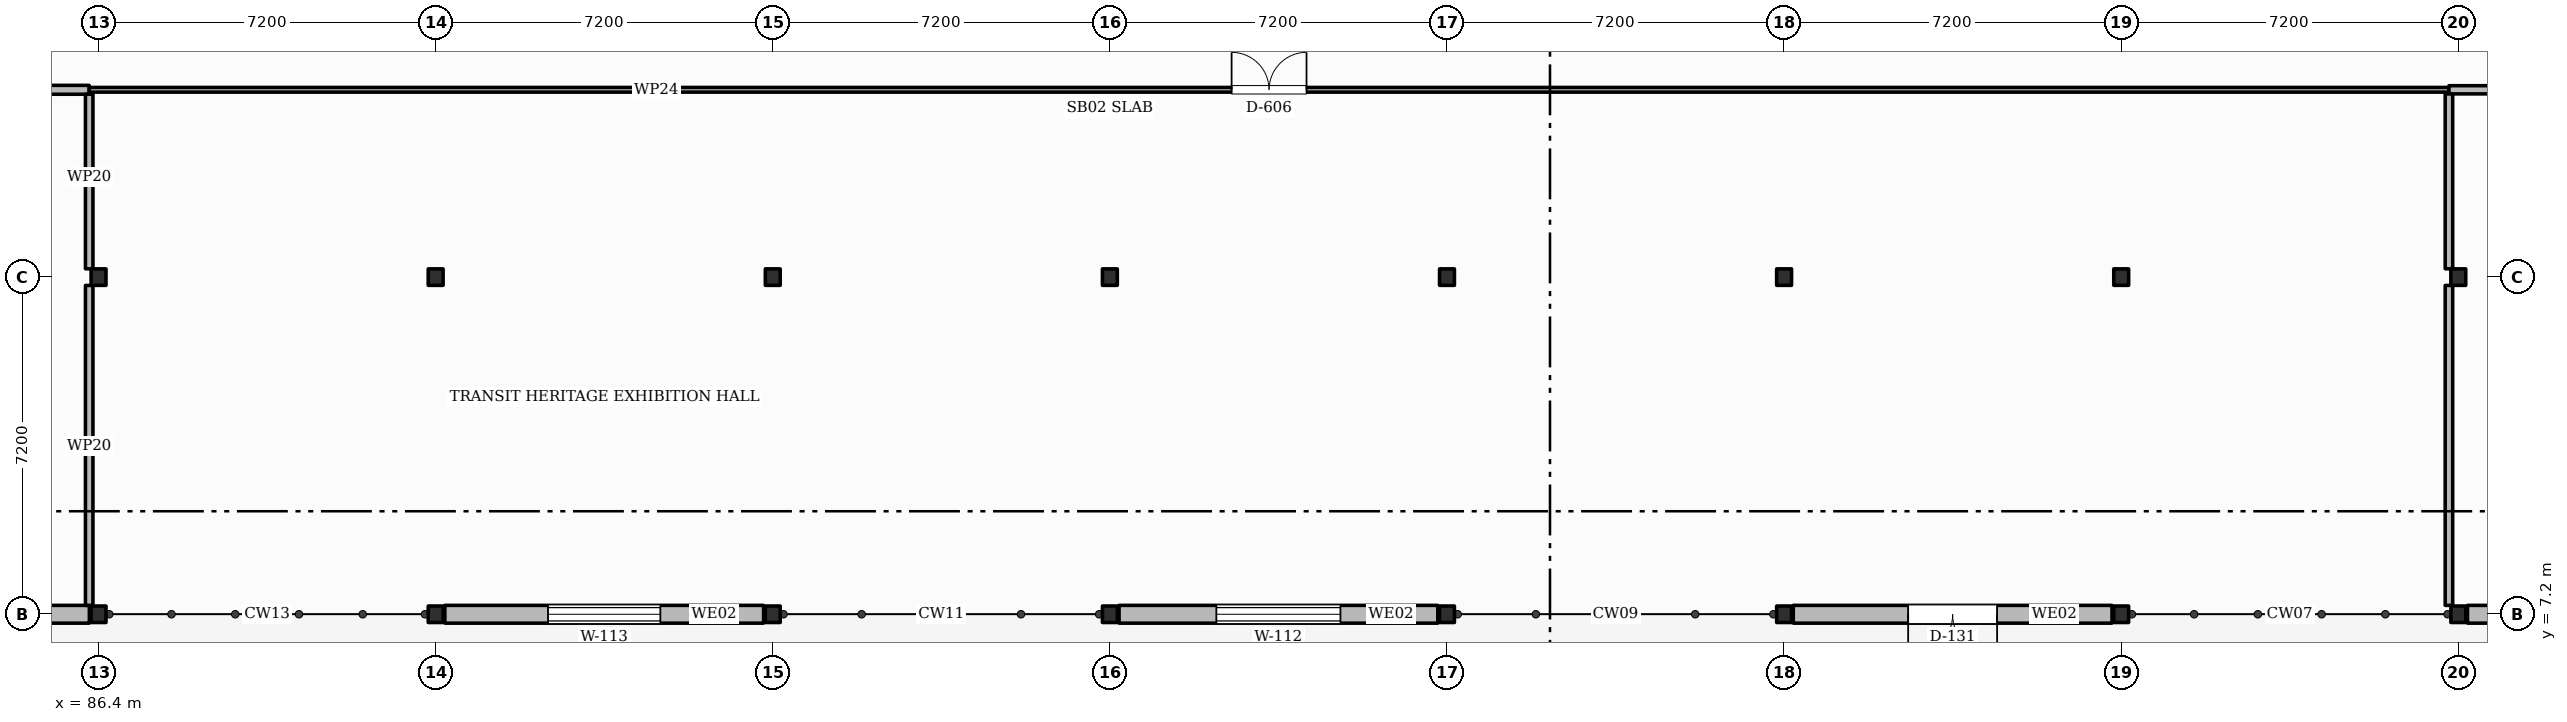
"""IFC4 building model, lengths in metres.
Left out: names, types, materials, properties, quantities, classifications, styles, units other than length and angle.
Written with IfcOpenShell. Run it as: python <this file> out.ifc"""

import sys

from ifc_helpers import new_model, si_unit, direction, frame, frame_2d, origin, origin_2d, place, context, subcontext, project, spatial, rectangle, i_section, extrude, element, fill, save


model = new_model("IFC4")
c1 = context("Model", 3, precision=1e-05, world=origin(), true_north=direction((0.0, 1.0)))
c2 = subcontext(c1, "Body", "Model", "MODEL_VIEW")
j1 = project(units=[si_unit("LENGTHUNIT", "METRE"), si_unit("PLANEANGLEUNIT", "RADIAN")], contexts=[c1])
p1 = place(None, origin())
s1 = spatial("IfcSite", under=j1, at=p1, CompositionType="ELEMENT")
p2 = place(p1, origin())
s2 = spatial("IfcBuilding", under=s1, at=p2, CompositionType="ELEMENT")
p3 = place(p2, origin())
s3 = spatial("IfcBuildingStorey", under=s2, at=p3, CompositionType="ELEMENT", Elevation=0.0)
for number, where, z_axis, x_axis in (
    (1, (86.4, 7.2, -0.3), (0.0, 0.0, 1.0), (1.0, 0.0, 0.0)),
    (2, (86.4, 14.4, -0.3), (0.0, 0.0, 1.0), (1.0, 0.0, 0.0)),
    (3, (93.6, 7.2, -0.3), (0.0, 0.0, 1.0), (1.0, 0.0, 0.0)),
    (4, (93.6, 14.4, -0.3), (0.0, 0.0, 1.0), (1.0, 0.0, 0.0)),
    (5, (100.8, 7.2, -0.3), (0.0, 0.0, 1.0), (1.0, 0.0, 0.0)),
    (6, (100.8, 14.4, -0.3), (0.0, 0.0, 1.0), (1.0, 0.0, 0.0)),
    (7, (108.0, 7.2, -0.3), (0.0, 0.0, 1.0), (1.0, 0.0, 0.0)),
    (8, (108.0, 14.4, -0.3), (0.0, 0.0, 1.0), (1.0, 0.0, 0.0)),
    (9, (115.2, 7.2, -0.3), (0.0, 0.0, 1.0), (1.0, 0.0, 0.0)),
    (10, (115.2, 14.4, -0.3), (0.0, 0.0, 1.0), (1.0, 0.0, 0.0)),
    (11, (122.4, 7.2, -0.3), (0.0, 0.0, 1.0), (1.0, 0.0, 0.0)),
    (12, (122.4, 14.4, -0.3), (0.0, 0.0, 1.0), (1.0, 0.0, 0.0)),
    (13, (129.6, 7.2, -0.3), (0.0, 0.0, 1.0), (1.0, 0.0, 0.0)),
    (14, (129.6, 14.4, -0.3), (0.0, 0.0, 1.0), (1.0, 0.0, 0.0)),
    (15, (136.8, 7.2, -0.3), (0.0, 0.0, 1.0), (1.0, 0.0, 0.0)),
    (16, (136.8, 14.4, -0.3), (0.0, 0.0, 1.0), (1.0, 0.0, 0.0)),
):
    element("IfcColumn", number, at=place(p3, frame(where, z_axis=z_axis, x_axis=x_axis)), inside=s3, PredefinedType="COLUMN", context=c2, shape_type="SweptSolid", body=[
        extrude(i_section(OverallWidth=0.318, OverallDepth=0.353, WebThickness=0.023, FlangeThickness=0.038, FilletRadius=0.015, at=origin_2d()), origin(), (0.0, 0.0, 1.0), 5.7),
    ])
p4 = place(p3, frame((143.804, 7.2, 0.0), z_axis=(0.0, 0.0, 1.0), x_axis=(-1.0, 0.0, 0.0)))
e17 = element("IfcWall", 17, at=p4, inside=s3, PredefinedType="SOLIDWALL", context=c2, shape_type="SweptSolid", body=[
    extrude(rectangle(XDim=6.807, YDim=0.38, at=frame_2d((3.404, 0.0))), origin(), (0.0, 0.0, 1.0), 4.618),
])
p5 = place(p4, frame((2.504, 0.0, 0.0)))
e18 = element("IfcOpeningElement", 18, at=p5, cuts=e17, PredefinedType="OPENING", context=c2, shape_type="SweptSolid", body=[
    extrude(rectangle(XDim=1.8, YDim=2.2, at=frame_2d((0.9, 1.1))), frame((0.0, 0.2, 0.0), z_axis=(0.0, -1.0, 0.0), x_axis=(1.0, 0.0, 0.0)), (0.0, 0.0, 1.0), 0.4),
])
p6 = place(p3, frame((129.404, 7.2, 0.0), z_axis=(0.0, 0.0, 1.0), x_axis=(-1.0, 0.0, 0.0)))
e19 = element("IfcWall", 19, at=p6, inside=s3, PredefinedType="SOLIDWALL", context=c2, shape_type="SweptSolid", body=[
    extrude(rectangle(XDim=6.808, YDim=0.38, at=frame_2d((3.404, 0.0))), origin(), (0.0, 0.0, 1.0), 4.618),
])
p7 = place(p6, frame((2.454, 0.0, 0.0)))
e20 = element("IfcOpeningElement", 20, at=p7, cuts=e19, PredefinedType="OPENING", context=c2, shape_type="SweptSolid", body=[
    extrude(rectangle(XDim=1.9, YDim=2.25, at=frame_2d((0.95, 1.125))), frame((0.0, 0.2, 0.0), z_axis=(0.0, -1.0, 0.0), x_axis=(1.0, 0.0, 0.0)), (0.0, 0.0, 1.0), 0.4),
])
p8 = place(p3, frame((115.004, 7.2, 0.0), z_axis=(0.0, 0.0, 1.0), x_axis=(-1.0, 0.0, 0.0)))
e21 = element("IfcWall", 21, at=p8, inside=s3, PredefinedType="SOLIDWALL", context=c2, shape_type="SweptSolid", body=[
    extrude(rectangle(XDim=6.807, YDim=0.38, at=frame_2d((3.404, 0.0))), origin(), (0.0, 0.0, 1.0), 4.618),
])
p9 = place(p8, frame((2.079, 0.0, 1.05)))
e22 = element("IfcOpeningElement", 22, at=p9, cuts=e21, PredefinedType="OPENING", context=c2, shape_type="SweptSolid", body=[
    extrude(rectangle(XDim=2.65, YDim=1.6, at=frame_2d((1.325, 0.8))), frame((0.0, 0.2, 0.0), z_axis=(0.0, -1.0, 0.0), x_axis=(1.0, 0.0, 0.0)), (0.0, 0.0, 1.0), 0.4),
])
p10 = place(p3, frame((100.604, 7.2, 0.0), z_axis=(0.0, 0.0, 1.0), x_axis=(-1.0, 0.0, 0.0)))
e23 = element("IfcWall", 23, at=p10, inside=s3, PredefinedType="SOLIDWALL", context=c2, shape_type="SweptSolid", body=[
    extrude(rectangle(XDim=6.807, YDim=0.38, at=frame_2d((3.404, 0.0))), origin(), (0.0, 0.0, 1.0), 4.618),
])
p11 = place(p10, frame((2.204, 0.0, 1.05)))
e24 = element("IfcOpeningElement", 24, at=p11, cuts=e23, PredefinedType="OPENING", context=c2, shape_type="SweptSolid", body=[
    extrude(rectangle(XDim=2.4, YDim=1.8, at=frame_2d((1.2, 0.9))), frame((0.0, 0.2, 0.0), z_axis=(0.0, -1.0, 0.0), x_axis=(1.0, 0.0, 0.0)), (0.0, 0.0, 1.0), 0.4),
])
p12 = place(p3, frame((86.204, 7.2, 0.0), z_axis=(0.0, 0.0, 1.0), x_axis=(-1.0, 0.0, 0.0)))
e25 = element("IfcWall", 25, at=p12, inside=s3, PredefinedType="SOLIDWALL", context=c2, shape_type="SweptSolid", body=[
    extrude(rectangle(XDim=6.807, YDim=0.38, at=frame_2d((3.404, 0.0))), origin(), (0.0, 0.0, 1.0), 4.618),
])
p13 = place(p12, frame((2.904, 0.0, 1.05)))
e26 = element("IfcOpeningElement", 26, at=p13, cuts=e25, PredefinedType="OPENING", context=c2, shape_type="SweptSolid", body=[
    extrude(rectangle(XDim=1.0, YDim=1.6, at=frame_2d((0.5, 0.8))), frame((0.0, 0.2, 0.0), z_axis=(0.0, -1.0, 0.0), x_axis=(1.0, 0.0, 0.0)), (0.0, 0.0, 1.0), 0.4),
])
p14 = place(p3, frame((57.825, 18.4, 0.0), z_axis=(0.0, 0.0, 1.0), x_axis=(1.0, 0.0, 0.0)))
e27 = element("IfcWall", 27, at=p14, inside=s3, PredefinedType="PARTITIONING", context=c2, shape_type="SweptSolid", body=[
    extrude(rectangle(XDim=28.375, YDim=0.19, at=frame_2d((14.188, 0.0))), origin(), (0.0, 0.0, 1.0), 3.55),
])
p15 = place(p14, frame((10.105, 0.0, 0.0)))
e28 = element("IfcOpeningElement", 28, at=p15, cuts=e27, PredefinedType="OPENING", context=c2, shape_type="SweptSolid", body=[
    extrude(rectangle(XDim=1.6, YDim=2.2, at=frame_2d((0.8, 1.1))), frame((0.0, 0.105, 0.0), z_axis=(0.0, -1.0, 0.0), x_axis=(1.0, 0.0, 0.0)), (0.0, 0.0, 1.0), 0.21),
])
p16 = place(p3, frame((86.2, 18.4, 0.0), z_axis=(0.0, 0.0, 1.0), x_axis=(1.0, 0.0, 0.0)))
e29 = element("IfcWall", 29, at=p16, inside=s3, PredefinedType="PARTITIONING", context=c2, shape_type="SweptSolid", body=[
    extrude(rectangle(XDim=50.4, YDim=0.1, at=frame_2d((25.2, 0.0))), origin(), (0.0, 0.0, 1.0), 3.55),
])
p17 = place(p16, frame((24.4, 0.0, 0.0)))
e30 = element("IfcOpeningElement", 30, at=p17, cuts=e29, PredefinedType="OPENING", context=c2, shape_type="SweptSolid", body=[
    extrude(rectangle(XDim=1.6, YDim=2.2, at=frame_2d((0.8, 1.1))), frame((0.0, 0.06, 0.0), z_axis=(0.0, -1.0, 0.0), x_axis=(1.0, 0.0, 0.0)), (0.0, 0.0, 1.0), 0.12),
])
p18 = place(p3, frame((136.6, 18.4, 0.0), z_axis=(0.0, 0.0, 1.0), x_axis=(1.0, 0.0, 0.0)))
e31 = element("IfcWall", 31, at=p18, inside=s3, PredefinedType="PARTITIONING", context=c2, shape_type="SweptSolid", body=[
    extrude(rectangle(XDim=21.575, YDim=0.175, at=frame_2d((10.788, 0.0))), origin(), (0.0, 0.0, 1.0), 3.55),
])
p19 = place(p18, frame((17.75, 0.0, 0.0)))
e32 = element("IfcOpeningElement", 32, at=p19, cuts=e31, PredefinedType="OPENING", context=c2, shape_type="SweptSolid", body=[
    extrude(rectangle(XDim=1.04, YDim=2.1, at=frame_2d((0.52, 1.05))), frame((0.0, 0.097, 0.0), z_axis=(0.0, -1.0, 0.0), x_axis=(1.0, 0.0, 0.0)), (0.0, 0.0, 1.0), 0.195),
])
p20 = place(p3, frame((86.2, 7.39, 0.0), z_axis=(0.0, 0.0, 1.0), x_axis=(0.0, 1.0, 0.0)))
e33 = element("IfcWall", 33, at=p20, inside=s3, PredefinedType="PARTITIONING", context=c2, shape_type="SweptSolid", body=[
    extrude(rectangle(XDim=6.832, YDim=0.16, at=frame_2d((3.416, 0.0))), origin(), (0.0, 0.0, 1.0), 3.55),
])
p21 = place(p3, frame((86.2, 14.578, 0.0), z_axis=(0.0, 0.0, 1.0), x_axis=(0.0, 1.0, 0.0)))
e34 = element("IfcWall", 34, at=p21, inside=s3, PredefinedType="PARTITIONING", context=c2, shape_type="SweptSolid", body=[
    extrude(rectangle(XDim=3.727, YDim=0.16, at=frame_2d((1.864, 0.0))), origin(), (0.0, 0.0, 1.0), 3.55),
])
p22 = place(p3, frame((136.6, 7.39, 0.0), z_axis=(0.0, 0.0, 1.0), x_axis=(0.0, 1.0, 0.0)))
e35 = element("IfcWall", 35, at=p22, inside=s3, PredefinedType="PARTITIONING", context=c2, shape_type="SweptSolid", body=[
    extrude(rectangle(XDim=6.832, YDim=0.16, at=frame_2d((3.416, 0.0))), origin(), (0.0, 0.0, 1.0), 3.55),
])
p23 = place(p3, frame((136.6, 14.578, 0.0), z_axis=(0.0, 0.0, 1.0), x_axis=(0.0, 1.0, 0.0)))
e36 = element("IfcWall", 36, at=p23, inside=s3, PredefinedType="PARTITIONING", context=c2, shape_type="SweptSolid", body=[
    extrude(rectangle(XDim=3.734, YDim=0.16, at=frame_2d((1.867, 0.0))), origin(), (0.0, 0.0, 1.0), 3.55),
])
p24 = place(p9, origin())
e37 = element("IfcWindow", 37, at=p24, inside=s3, PartitioningType="SINGLE_PANEL", PredefinedType="WINDOW", context=c2, shape_type="SweptSolid", body=[
    extrude(rectangle(XDim=2.65, YDim=1.6, at=frame_2d((1.325, 0.8))), frame((0.0, 0.03, 0.0), z_axis=(0.0, -1.0, 0.0), x_axis=(1.0, 0.0, 0.0)), (0.0, 0.0, 1.0), 0.06),
])
fill(e22, e37)
p25 = place(p11, origin())
e38 = element("IfcWindow", 38, at=p25, inside=s3, PartitioningType="SINGLE_PANEL", PredefinedType="WINDOW", context=c2, shape_type="SweptSolid", body=[
    extrude(rectangle(XDim=2.4, YDim=1.8, at=frame_2d((1.2, 0.9))), frame((0.0, 0.03, 0.0), z_axis=(0.0, -1.0, 0.0), x_axis=(1.0, 0.0, 0.0)), (0.0, 0.0, 1.0), 0.06),
])
fill(e24, e38)
p26 = place(p7, origin())
e39 = element("IfcDoor", 39, at=p26, inside=s3, OperationType="DOUBLE_SWING_LEFT", PredefinedType="DOOR", context=c2, shape_type="SweptSolid", body=[
    extrude(rectangle(XDim=1.9, YDim=2.25, at=frame_2d((0.95, 1.125))), frame((0.0, 0.025, 0.0), z_axis=(0.0, -1.0, 0.0), x_axis=(1.0, 0.0, 0.0)), (0.0, 0.0, 1.0), 0.05),
])
fill(e20, e39)
p27 = place(p17, origin())
e40 = element("IfcDoor", 40, at=p27, inside=s3, OperationType="DOUBLE_SWING_LEFT", PredefinedType="DOOR", context=c2, shape_type="SweptSolid", body=[
    extrude(rectangle(XDim=1.6, YDim=2.2, at=frame_2d((0.8, 1.1))), frame((0.0, 0.025, 0.0), z_axis=(0.0, -1.0, 0.0), x_axis=(1.0, 0.0, 0.0)), (0.0, 0.0, 1.0), 0.05),
])
fill(e30, e40)
save(model, sys.argv[1])
